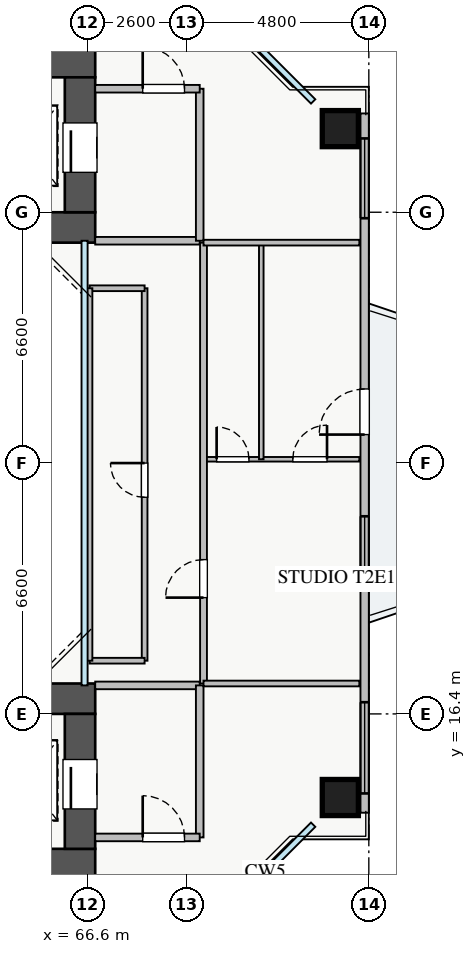
"""IFC4 building model, lengths in metres.
Left out: names, types, materials, properties, quantities, classifications, styles, units other than length and angle.
Written with IfcOpenShell. Run it as: python <this file> out.ifc"""

import sys

from ifc_helpers import new_model, si_unit, direction, frame, frame_2d, origin, origin_2d, place, context, subcontext, project, spatial, rectangle, extrude, source, transform, mapped, element, fill, save


model = new_model("IFC4")
c1 = context("Model", 3, precision=1e-05, world=origin(), true_north=direction((0.0, 1.0)))
c2 = subcontext(c1, "Body", "Model", "MODEL_VIEW")
j1 = project(units=[si_unit("LENGTHUNIT", "METRE"), si_unit("PLANEANGLEUNIT", "RADIAN")], contexts=[c1])
p1 = place(None, origin())
s1 = spatial("IfcSite", under=j1, at=p1, CompositionType="ELEMENT")
p2 = place(p1, origin())
s2 = spatial("IfcBuilding", under=s1, at=p2, CompositionType="ELEMENT")
p3 = place(p2, frame((0.0, 0.0, 39.25)))
s3 = spatial("IfcBuildingStorey", under=s2, at=p3, CompositionType="ELEMENT", Elevation=39.25)
p4 = place(p3, frame((54.2, 29.2, 0.0), z_axis=(0.0, 0.0, 1.0), x_axis=(1.0, 0.0, 0.0)))
e1 = element("IfcWall", 1, at=p4, inside=s3, PredefinedType="SHEAR", context=c2, shape_type="SweptSolid", body=[
    extrude(rectangle(XDim=12.6, YDim=0.8, at=frame_2d((6.3, 0.0))), origin(), (0.0, 0.0, 1.0), 3.25),
])
p5 = place(p3, frame((54.2, 33.55, 0.0), z_axis=(0.0, 0.0, 1.0), x_axis=(1.0, 0.0, 0.0)))
e2 = element("IfcWall", 2, at=p5, inside=s3, PredefinedType="SHEAR", context=c2, shape_type="SweptSolid", body=[
    extrude(rectangle(XDim=12.6, YDim=0.8, at=frame_2d((6.3, 0.0))), origin(), (0.0, 0.0, 1.0), 3.25),
])
p6 = place(p5, frame((8.2, 0.0, 0.0)))
e3 = element("IfcOpeningElement", 3, at=p6, cuts=e2, PredefinedType="OPENING", context=c2, shape_type="SweptSolid", body=[
    extrude(rectangle(XDim=1.1, YDim=2.05, at=frame_2d((0.55, 1.025))), frame((0.0, 0.41, 0.0), z_axis=(0.0, -1.0, 0.0), x_axis=(1.0, 0.0, 0.0)), (0.0, 0.0, 1.0), 0.82),
])
p7 = place(p3, frame((66.4, 29.6, 0.0), z_axis=(0.0, 0.0, 1.0), x_axis=(0.0, 1.0, 0.0)))
e4 = element("IfcWall", 4, at=p7, inside=s3, PredefinedType="SHEAR", context=c2, shape_type="SweptSolid", body=[
    extrude(rectangle(XDim=3.55, YDim=0.8, at=frame_2d((1.775, 0.0))), origin(), (0.0, 0.0, 1.0), 3.25),
])
p8 = place(p7, frame((1.05, 0.0, 0.0)))
e5 = element("IfcOpeningElement", 5, at=p8, cuts=e4, PredefinedType="OPENING", context=c2, shape_type="SweptSolid", body=[
    extrude(rectangle(XDim=1.3, YDim=2.05, at=frame_2d((0.65, 1.025))), frame((0.0, 0.41, 0.0), z_axis=(0.0, -1.0, 0.0), x_axis=(1.0, 0.0, 0.0)), (0.0, 0.0, 1.0), 0.82),
])
p9 = place(p3, frame((54.2, 12.45, 0.0), z_axis=(0.0, 0.0, 1.0), x_axis=(1.0, 0.0, 0.0)))
e6 = element("IfcWall", 6, at=p9, inside=s3, PredefinedType="SHEAR", context=c2, shape_type="SweptSolid", body=[
    extrude(rectangle(XDim=12.6, YDim=0.8, at=frame_2d((6.3, 0.0))), origin(), (0.0, 0.0, 1.0), 3.25),
])
p10 = place(p9, frame((8.2, 0.0, 0.0)))
e7 = element("IfcOpeningElement", 7, at=p10, cuts=e6, PredefinedType="OPENING", context=c2, shape_type="SweptSolid", body=[
    extrude(rectangle(XDim=1.1, YDim=2.05, at=frame_2d((0.55, 1.025))), frame((0.0, 0.41, 0.0), z_axis=(0.0, -1.0, 0.0), x_axis=(1.0, 0.0, 0.0)), (0.0, 0.0, 1.0), 0.82),
])
p11 = place(p3, frame((54.2, 16.8, 0.0), z_axis=(0.0, 0.0, 1.0), x_axis=(1.0, 0.0, 0.0)))
e8 = element("IfcWall", 8, at=p11, inside=s3, PredefinedType="SHEAR", context=c2, shape_type="SweptSolid", body=[
    extrude(rectangle(XDim=12.6, YDim=0.8, at=frame_2d((6.3, 0.0))), origin(), (0.0, 0.0, 1.0), 3.25),
])
p12 = place(p3, frame((66.4, 12.85, 0.0), z_axis=(0.0, 0.0, 1.0), x_axis=(0.0, 1.0, 0.0)))
e9 = element("IfcWall", 9, at=p12, inside=s3, PredefinedType="SHEAR", context=c2, shape_type="SweptSolid", body=[
    extrude(rectangle(XDim=3.55, YDim=0.8, at=frame_2d((1.775, 0.0))), origin(), (0.0, 0.0, 1.0), 3.25),
])
p13 = place(p12, frame((1.05, 0.0, 0.0)))
e10 = element("IfcOpeningElement", 10, at=p13, cuts=e9, PredefinedType="OPENING", context=c2, shape_type="SweptSolid", body=[
    extrude(rectangle(XDim=1.3, YDim=2.05, at=frame_2d((0.65, 1.025))), frame((0.0, 0.41, 0.0), z_axis=(0.0, -1.0, 0.0), x_axis=(1.0, 0.0, 0.0)), (0.0, 0.0, 1.0), 0.82),
])
m1 = source(origin(), c2, "Body", "SweptSolid", [
    extrude(rectangle(XDim=0.95, YDim=0.95, at=origin_2d()), origin(), (0.0, 0.0, 1.0), 3.25),
])
for number, where, z_axis, x_axis in (
    (11, (73.25, 14.2, 0.0), (0.0, 0.0, 1.0), (1.0, 0.0, 0.0)),
    (12, (73.25, 31.8, 0.0), (0.0, 0.0, 1.0), (1.0, 0.0, 0.0)),
):
    element("IfcColumn", number, at=place(p3, frame(where, z_axis=z_axis, x_axis=x_axis)), inside=s3, PredefinedType="COLUMN", context=c2, shape_type="MappedRepresentation", body=[
        mapped(m1, transform((0.0, 0.0, 0.0), x_axis=(1.0, 0.0, 0.0), y_axis=(0.0, 1.0, 0.0), z_axis=(0.0, 0.0, 1.0), scale=1.0)),
    ])
p14 = place(p3, frame((73.89, 13.8, 0.0), z_axis=(0.0, 0.0, 1.0), x_axis=(0.0, 1.0, 0.0)))
e13 = element("IfcWall", 13, at=p14, inside=s3, PredefinedType="STANDARD", context=c2, shape_type="SweptSolid", body=[
    extrude(rectangle(XDim=18.4, YDim=0.22, at=frame_2d((9.2, 0.0))), origin(), (0.0, 0.0, 1.0), 2.61),
])
p15 = place(p14, frame((9.95, 0.0, 0.0)))
e14 = element("IfcOpeningElement", 14, at=p15, cuts=e13, PredefinedType="OPENING", context=c2, shape_type="SweptSolid", body=[
    extrude(rectangle(XDim=1.2, YDim=2.1, at=frame_2d((0.6, 1.05))), frame((0.0, 0.12, 0.0), z_axis=(0.0, -1.0, 0.0), x_axis=(1.0, 0.0, 0.0)), (0.0, 0.0, 1.0), 0.24),
])
p16 = place(p14, frame((0.508, 0.0, 0.9)))
e15 = element("IfcOpeningElement", 15, at=p16, cuts=e13, PredefinedType="OPENING", context=c2, shape_type="SweptSolid", body=[
    extrude(rectangle(XDim=2.4, YDim=1.5, at=frame_2d((1.2, 0.75))), frame((0.0, 0.12, 0.0), z_axis=(0.0, -1.0, 0.0), x_axis=(1.0, 0.0, 0.0)), (0.0, 0.0, 1.0), 0.24),
])
p17 = place(p14, frame((6.0, 0.0, 0.9)))
e16 = element("IfcOpeningElement", 16, at=p17, cuts=e13, PredefinedType="OPENING", context=c2, shape_type="SweptSolid", body=[
    extrude(rectangle(XDim=1.8, YDim=1.45, at=frame_2d((0.9, 0.725))), frame((0.0, 0.12, 0.0), z_axis=(0.0, -1.0, 0.0), x_axis=(1.0, 0.0, 0.0)), (0.0, 0.0, 1.0), 0.24),
])
p18 = place(p14, frame((15.643, 0.0, 0.9)))
e17 = element("IfcOpeningElement", 17, at=p18, cuts=e13, PredefinedType="OPENING", context=c2, shape_type="SweptSolid", body=[
    extrude(rectangle(XDim=2.1, YDim=1.5, at=frame_2d((1.05, 0.75))), frame((0.0, 0.12, 0.0), z_axis=(0.0, -1.0, 0.0), x_axis=(1.0, 0.0, 0.0)), (0.0, 0.0, 1.0), 0.24),
])
p19 = place(p3, frame((66.8, 28.85, 0.0), z_axis=(0.0, 0.0, 1.0), x_axis=(1.0, 0.0, 0.0)))
e18 = element("IfcWall", 18, at=p19, inside=s3, PredefinedType="PARTITIONING", context=c2, shape_type="SweptSolid", body=[
    extrude(rectangle(XDim=2.75, YDim=0.2, at=frame_2d((1.375, 0.0))), origin(), (0.0, 0.0, 1.0), 3.07),
])
p20 = place(p3, frame((69.55, 28.85, 0.0), z_axis=(0.0, 0.0, 1.0), x_axis=(0.0, 1.0, 0.0)))
e19 = element("IfcWall", 19, at=p20, inside=s3, PredefinedType="PARTITIONING", context=c2, shape_type="SweptSolid", body=[
    extrude(rectangle(XDim=4.0, YDim=0.2, at=frame_2d((2.0, 0.0))), origin(), (0.0, 0.0, 1.0), 2.615),
])
p21 = place(p3, frame((66.8, 32.85, 0.0), z_axis=(0.0, 0.0, 1.0), x_axis=(1.0, 0.0, 0.0)))
e20 = element("IfcWall", 20, at=p21, inside=s3, PredefinedType="PARTITIONING", context=c2, shape_type="SweptSolid", body=[
    extrude(rectangle(XDim=2.75, YDim=0.2, at=frame_2d((1.375, 0.0))), origin(), (0.0, 0.0, 1.0), 3.07),
])
p22 = place(p21, frame((1.25, 0.0, 0.0)))
e21 = element("IfcOpeningElement", 21, at=p22, cuts=e20, PredefinedType="OPENING", context=c2, shape_type="SweptSolid", body=[
    extrude(rectangle(XDim=1.1, YDim=2.05, at=frame_2d((0.55, 1.025))), frame((0.0, 0.11, 0.0), z_axis=(0.0, -1.0, 0.0), x_axis=(1.0, 0.0, 0.0)), (0.0, 0.0, 1.0), 0.22),
])
p23 = place(p3, frame((66.8, 17.15, 0.0), z_axis=(0.0, 0.0, 1.0), x_axis=(1.0, 0.0, 0.0)))
e22 = element("IfcWall", 22, at=p23, inside=s3, PredefinedType="PARTITIONING", context=c2, shape_type="SweptSolid", body=[
    extrude(rectangle(XDim=2.75, YDim=0.2, at=frame_2d((1.375, 0.0))), origin(), (0.0, 0.0, 1.0), 3.07),
])
p24 = place(p3, frame((69.55, 13.15, 0.0), z_axis=(0.0, 0.0, 1.0), x_axis=(0.0, 1.0, 0.0)))
e23 = element("IfcWall", 23, at=p24, inside=s3, PredefinedType="PARTITIONING", context=c2, shape_type="SweptSolid", body=[
    extrude(rectangle(XDim=4.0, YDim=0.2, at=frame_2d((2.0, 0.0))), origin(), (0.0, 0.0, 1.0), 2.615),
])
p25 = place(p3, frame((66.8, 13.15, 0.0), z_axis=(0.0, 0.0, 1.0), x_axis=(1.0, 0.0, 0.0)))
e24 = element("IfcWall", 24, at=p25, inside=s3, PredefinedType="PARTITIONING", context=c2, shape_type="SweptSolid", body=[
    extrude(rectangle(XDim=2.75, YDim=0.2, at=frame_2d((1.375, 0.0))), origin(), (0.0, 0.0, 1.0), 3.07),
])
p26 = place(p25, frame((1.25, 0.0, 0.0)))
e25 = element("IfcOpeningElement", 25, at=p26, cuts=e24, PredefinedType="OPENING", context=c2, shape_type="SweptSolid", body=[
    extrude(rectangle(XDim=1.1, YDim=2.05, at=frame_2d((0.55, 1.025))), frame((0.0, 0.11, 0.0), z_axis=(0.0, -1.0, 0.0), x_axis=(1.0, 0.0, 0.0)), (0.0, 0.0, 1.0), 0.22),
])
p27 = place(p3, frame((69.65, 23.1, 0.0), z_axis=(0.0, 0.0, 1.0), x_axis=(1.0, 0.0, 0.0)))
e26 = element("IfcWall", 26, at=p27, inside=s3, PredefinedType="PLUMBINGWALL", context=c2, shape_type="SweptSolid", body=[
    extrude(rectangle(XDim=4.1, YDim=0.12, at=frame_2d((2.05, 0.0))), origin(), (0.0, 0.0, 1.0), 2.765),
])
p28 = place(p27, frame((0.345, 0.0, 0.0)))
e27 = element("IfcOpeningElement", 27, at=p28, cuts=e26, PredefinedType="OPENING", context=c2, shape_type="SweptSolid", body=[
    extrude(rectangle(XDim=0.85, YDim=2.05, at=frame_2d((0.425, 1.025))), frame((0.0, 0.07, 0.0), z_axis=(0.0, -1.0, 0.0), x_axis=(1.0, 0.0, 0.0)), (0.0, 0.0, 1.0), 0.14),
])
p29 = place(p27, frame((2.35, 0.0, 0.0)))
e28 = element("IfcOpeningElement", 28, at=p29, cuts=e26, PredefinedType="OPENING", context=c2, shape_type="SweptSolid", body=[
    extrude(rectangle(XDim=0.9, YDim=2.05, at=frame_2d((0.45, 1.025))), frame((0.0, 0.07, 0.0), z_axis=(0.0, -1.0, 0.0), x_axis=(1.0, 0.0, 0.0)), (0.0, 0.0, 1.0), 0.14),
])
p30 = place(p3, frame((71.17, 23.1, 0.0), z_axis=(0.0, 0.0, 1.0), x_axis=(0.0, 1.0, 0.0)))
e29 = element("IfcWall", 29, at=p30, inside=s3, PredefinedType="PLUMBINGWALL", context=c2, shape_type="SweptSolid", body=[
    extrude(rectangle(XDim=5.7, YDim=0.12, at=frame_2d((2.85, 0.0))), origin(), (0.0, 0.0, 1.0), 3.07),
])
p31 = place(p3, frame((69.65, 17.2, 0.0), z_axis=(0.0, 0.0, 1.0), x_axis=(0.0, 1.0, 0.0)))
e30 = element("IfcWall", 30, at=p31, inside=s3, PredefinedType="PARTITIONING", context=c2, shape_type="SweptSolid", body=[
    extrude(rectangle(XDim=11.6, YDim=0.18, at=frame_2d((5.8, 0.0))), origin(), (0.0, 0.0, 1.0), 3.07),
])
p32 = place(p31, frame((2.26, 0.0, 0.0)))
e31 = element("IfcOpeningElement", 31, at=p32, cuts=e30, PredefinedType="OPENING", context=c2, shape_type="SweptSolid", body=[
    extrude(rectangle(XDim=1.0, YDim=2.05, at=frame_2d((0.5, 1.025))), frame((0.0, 0.1, 0.0), z_axis=(0.0, -1.0, 0.0), x_axis=(1.0, 0.0, 0.0)), (0.0, 0.0, 1.0), 0.2),
])
for number, where, z_axis, x_axis in (
    (32, (69.65, 17.2, 0.0), (0.0, 0.0, 1.0), (1.0, 0.0, 0.0)),
    (33, (69.65, 28.8, 0.0), (0.0, 0.0, 1.0), (1.0, 0.0, 0.0)),
):
    element("IfcWall", number, at=place(p3, frame(where, z_axis=z_axis, x_axis=x_axis)), inside=s3, PredefinedType="PARTITIONING", context=c2, shape_type="SweptSolid", body=[
        extrude(rectangle(XDim=4.1, YDim=0.15, at=frame_2d((2.05, 0.0))), origin(), (0.0, 0.0, 1.0), 3.07),
    ])
p33 = place(p3, frame((68.1, 17.8, 0.0), z_axis=(0.0, 0.0, 1.0), x_axis=(0.0, 1.0, 0.0)))
e34 = element("IfcWall", 34, at=p33, inside=s3, PredefinedType="PARTITIONING", context=c2, shape_type="SweptSolid", body=[
    extrude(rectangle(XDim=9.8, YDim=0.15, at=frame_2d((4.9, 0.0))), origin(), (0.0, 0.0, 1.0), 3.07),
])
p34 = place(p33, frame((4.3, 0.0, 0.0)))
e35 = element("IfcOpeningElement", 35, at=p34, cuts=e34, PredefinedType="OPENING", context=c2, shape_type="SweptSolid", body=[
    extrude(rectangle(XDim=0.9, YDim=2.05, at=frame_2d((0.45, 1.025))), frame((0.0, 0.085, 0.0), z_axis=(0.0, -1.0, 0.0), x_axis=(1.0, 0.0, 0.0)), (0.0, 0.0, 1.0), 0.17),
])
p35 = place(p3, frame((66.65, 27.6, 0.0), z_axis=(0.0, 0.0, 1.0), x_axis=(1.0, 0.0, 0.0)))
e36 = element("IfcWall", 36, at=p35, inside=s3, PredefinedType="PARTITIONING", context=c2, shape_type="SweptSolid", body=[
    extrude(rectangle(XDim=1.45, YDim=0.15, at=frame_2d((0.725, 0.0))), origin(), (0.0, 0.0, 1.0), 2.765),
])
p36 = place(p3, frame((66.65, 17.8, 0.0), z_axis=(0.0, 0.0, 1.0), x_axis=(1.0, 0.0, 0.0)))
e37 = element("IfcWall", 37, at=p36, inside=s3, PredefinedType="PARTITIONING", context=c2, shape_type="SweptSolid", body=[
    extrude(rectangle(XDim=1.45, YDim=0.15, at=frame_2d((0.725, 0.0))), origin(), (0.0, 0.0, 1.0), 3.07),
])
p37 = place(p3, frame((66.65, 17.8, 0.0), z_axis=(0.0, 0.0, 1.0), x_axis=(0.0, 1.0, 0.0)))
e38 = element("IfcWall", 38, at=p37, inside=s3, PredefinedType="PARTITIONING", context=c2, shape_type="SweptSolid", body=[
    extrude(rectangle(XDim=9.8, YDim=0.15, at=frame_2d((4.9, 0.0))), origin(), (0.0, 0.0, 1.0), 2.665),
])
m2 = source(origin(), c2, "Body", "SweptSolid", [
    extrude(rectangle(XDim=1.2, YDim=2.1, at=frame_2d((0.6, 1.05))), frame((0.0, 0.025, 0.0), z_axis=(0.0, -1.0, 0.0), x_axis=(1.0, 0.0, 0.0)), (0.0, 0.0, 1.0), 0.05),
])
p38 = place(p15, origin())
e39 = element("IfcDoor", 39, at=p38, inside=s3, OperationType="SINGLE_SWING_LEFT", PredefinedType="DOOR", context=c2, shape_type="MappedRepresentation", body=[
    mapped(m2, transform((0.0, 0.0, 0.0), x_axis=(1.0, 0.0, 0.0), y_axis=(0.0, 1.0, 0.0), z_axis=(0.0, 0.0, 1.0), scale=1.0)),
])
fill(e14, e39)
m3 = source(origin(), c2, "Body", "SweptSolid", [
    extrude(rectangle(XDim=2.4, YDim=1.5, at=frame_2d((1.2, 0.75))), frame((0.0, 0.03, 0.0), z_axis=(0.0, -1.0, 0.0), x_axis=(1.0, 0.0, 0.0)), (0.0, 0.0, 1.0), 0.06),
])
p39 = place(p16, origin())
e40 = element("IfcWindow", 40, at=p39, inside=s3, PartitioningType="TRIPLE_PANEL_VERTICAL", PredefinedType="WINDOW", context=c2, shape_type="MappedRepresentation", body=[
    mapped(m3, transform((0.0, 0.0, 0.0), x_axis=(1.0, 0.0, 0.0), y_axis=(0.0, 1.0, 0.0), z_axis=(0.0, 0.0, 1.0), scale=1.0)),
])
fill(e15, e40)
m4 = source(origin(), c2, "Body", "SweptSolid", [
    extrude(rectangle(XDim=1.8, YDim=1.45, at=frame_2d((0.9, 0.725))), frame((0.0, 0.03, 0.0), z_axis=(0.0, -1.0, 0.0), x_axis=(1.0, 0.0, 0.0)), (0.0, 0.0, 1.0), 0.06),
])
p40 = place(p17, origin())
e41 = element("IfcWindow", 41, at=p40, inside=s3, PartitioningType="DOUBLE_PANEL_VERTICAL", PredefinedType="WINDOW", context=c2, shape_type="MappedRepresentation", body=[
    mapped(m4, transform((0.0, 0.0, 0.0), x_axis=(1.0, 0.0, 0.0), y_axis=(0.0, 1.0, 0.0), z_axis=(0.0, 0.0, 1.0), scale=1.0)),
])
fill(e16, e41)
m5 = source(origin(), c2, "Body", "SweptSolid", [
    extrude(rectangle(XDim=2.1, YDim=1.5, at=frame_2d((1.05, 0.75))), frame((0.0, 0.03, 0.0), z_axis=(0.0, -1.0, 0.0), x_axis=(1.0, 0.0, 0.0)), (0.0, 0.0, 1.0), 0.06),
])
p41 = place(p18, origin())
e42 = element("IfcWindow", 42, at=p41, inside=s3, PartitioningType="TRIPLE_PANEL_VERTICAL", PredefinedType="WINDOW", context=c2, shape_type="MappedRepresentation", body=[
    mapped(m5, transform((0.0, 0.0, 0.0), x_axis=(1.0, 0.0, 0.0), y_axis=(0.0, 1.0, 0.0), z_axis=(0.0, 0.0, 1.0), scale=1.0)),
])
fill(e17, e42)
m6 = source(origin(), c2, "Body", "SweptSolid", [
    extrude(rectangle(XDim=1.3, YDim=2.05, at=frame_2d((0.65, 1.025))), frame((0.0, 0.025, 0.0), z_axis=(0.0, -1.0, 0.0), x_axis=(1.0, 0.0, 0.0)), (0.0, 0.0, 1.0), 0.05),
])
p42 = place(p8, origin())
e43 = element("IfcDoor", 43, at=p42, inside=s3, OperationType="SLIDING_TO_LEFT", PredefinedType="DOOR", context=c2, shape_type="MappedRepresentation", body=[
    mapped(m6, transform((0.0, 0.0, 0.0), x_axis=(1.0, 0.0, 0.0), y_axis=(0.0, 1.0, 0.0), z_axis=(0.0, 0.0, 1.0), scale=1.0)),
])
fill(e5, e43)
p43 = place(p13, origin())
e44 = element("IfcDoor", 44, at=p43, inside=s3, OperationType="SLIDING_TO_RIGHT", PredefinedType="DOOR", context=c2, shape_type="MappedRepresentation", body=[
    mapped(m6, transform((0.0, 0.0, 0.0), x_axis=(1.0, 0.0, 0.0), y_axis=(0.0, 1.0, 0.0), z_axis=(0.0, 0.0, 1.0), scale=1.0)),
])
fill(e10, e44)
m7 = source(origin(), c2, "Body", "SweptSolid", [
    extrude(rectangle(XDim=1.1, YDim=2.05, at=frame_2d((0.55, 1.025))), frame((0.0, 0.025, 0.0), z_axis=(0.0, -1.0, 0.0), x_axis=(1.0, 0.0, 0.0)), (0.0, 0.0, 1.0), 0.05),
])
p44 = place(p22, origin())
e45 = element("IfcDoor", 45, at=p44, inside=s3, OperationType="SINGLE_SWING_LEFT", PredefinedType="DOOR", context=c2, shape_type="MappedRepresentation", body=[
    mapped(m7, transform((0.0, 0.0, 0.0), x_axis=(1.0, 0.0, 0.0), y_axis=(0.0, 1.0, 0.0), z_axis=(0.0, 0.0, 1.0), scale=1.0)),
])
fill(e21, e45)
p45 = place(p26, origin())
e46 = element("IfcDoor", 46, at=p45, inside=s3, OperationType="SINGLE_SWING_LEFT", PredefinedType="DOOR", context=c2, shape_type="MappedRepresentation", body=[
    mapped(m7, transform((0.0, 0.0, 0.0), x_axis=(1.0, 0.0, 0.0), y_axis=(0.0, 1.0, 0.0), z_axis=(0.0, 0.0, 1.0), scale=1.0)),
])
fill(e25, e46)
m8 = source(origin(), c2, "Body", "SweptSolid", [
    extrude(rectangle(XDim=0.85, YDim=2.05, at=frame_2d((0.425, 1.025))), frame((0.0, 0.025, 0.0), z_axis=(0.0, -1.0, 0.0), x_axis=(1.0, 0.0, 0.0)), (0.0, 0.0, 1.0), 0.05),
])
p46 = place(p28, origin())
e47 = element("IfcDoor", 47, at=p46, inside=s3, OperationType="SINGLE_SWING_LEFT", PredefinedType="DOOR", context=c2, shape_type="MappedRepresentation", body=[
    mapped(m8, transform((0.0, 0.0, 0.0), x_axis=(1.0, 0.0, 0.0), y_axis=(0.0, 1.0, 0.0), z_axis=(0.0, 0.0, 1.0), scale=1.0)),
])
fill(e27, e47)
m9 = source(origin(), c2, "Body", "SweptSolid", [
    extrude(rectangle(XDim=0.9, YDim=2.05, at=frame_2d((0.45, 1.025))), frame((0.0, 0.025, 0.0), z_axis=(0.0, -1.0, 0.0), x_axis=(1.0, 0.0, 0.0)), (0.0, 0.0, 1.0), 0.05),
])
p47 = place(p29, origin())
e48 = element("IfcDoor", 48, at=p47, inside=s3, OperationType="SINGLE_SWING_RIGHT", PredefinedType="DOOR", context=c2, shape_type="MappedRepresentation", body=[
    mapped(m9, transform((0.0, 0.0, 0.0), x_axis=(1.0, 0.0, 0.0), y_axis=(0.0, 1.0, 0.0), z_axis=(0.0, 0.0, 1.0), scale=1.0)),
])
fill(e28, e48)
m10 = source(origin(), c2, "Body", "SweptSolid", [
    extrude(rectangle(XDim=1.0, YDim=2.05, at=frame_2d((0.5, 1.025))), frame((0.0, 0.025, 0.0), z_axis=(0.0, -1.0, 0.0), x_axis=(1.0, 0.0, 0.0)), (0.0, 0.0, 1.0), 0.05),
])
p48 = place(p32, origin())
e49 = element("IfcDoor", 49, at=p48, inside=s3, OperationType="SINGLE_SWING_LEFT", PredefinedType="DOOR", context=c2, shape_type="MappedRepresentation", body=[
    mapped(m10, transform((0.0, 0.0, 0.0), x_axis=(1.0, 0.0, 0.0), y_axis=(0.0, 1.0, 0.0), z_axis=(0.0, 0.0, 1.0), scale=1.0)),
])
fill(e31, e49)
p49 = place(p34, origin())
e50 = element("IfcDoor", 50, at=p49, inside=s3, OperationType="SINGLE_SWING_RIGHT", PredefinedType="DOOR", context=c2, shape_type="MappedRepresentation", body=[
    mapped(m9, transform((0.0, 0.0, 0.0), x_axis=(1.0, 0.0, 0.0), y_axis=(0.0, 1.0, 0.0), z_axis=(0.0, 0.0, 1.0), scale=1.0)),
])
fill(e35, e50)
save(model, sys.argv[1])
